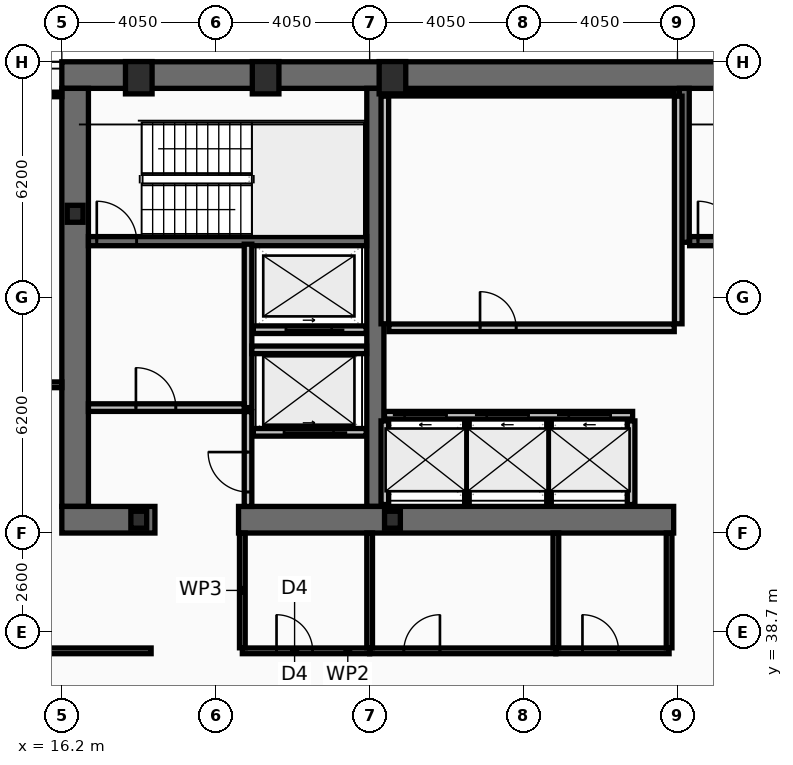
"""IFC4 building model, lengths in metres.
Left out: names, types, materials, properties, quantities, classifications, styles, units other than length and angle.
Written with IfcOpenShell. Run it as: python <this file> out.ifc"""

import sys

from ifc_helpers import new_model, si_unit, direction, frame, frame_2d, origin, origin_2d, place, context, subcontext, project, spatial, rectangle, hollow_rectangle, i_section, extrude, element, fill, save


model = new_model("IFC4")
c1 = context("Model", 3, precision=1e-05, world=origin(), true_north=direction((0.0, 1.0)))
c2 = subcontext(c1, "Body", "Model", "MODEL_VIEW")
j1 = project(units=[si_unit("LENGTHUNIT", "METRE"), si_unit("PLANEANGLEUNIT", "RADIAN")], contexts=[c1])
p1 = place(None, origin())
s1 = spatial("IfcSite", under=j1, at=p1, CompositionType="ELEMENT")
p2 = place(p1, origin())
s2 = spatial("IfcBuilding", under=s1, at=p2, CompositionType="ELEMENT")
p3 = place(p2, frame((0.0, 0.0, 157.8)))
s3 = spatial("IfcBuildingStorey", under=s2, at=p3, CompositionType="ELEMENT", Elevation=157.8)
p4 = place(p3, frame((16.2, 53.35, 0.0), z_axis=(0.0, 0.0, 1.0), x_axis=(1.0, 0.0, 0.0)))
e1 = element("IfcWall", 1, at=p4, inside=s3, PredefinedType="SHEAR", context=c2, shape_type="SweptSolid", body=[
    extrude(rectangle(XDim=40.5, YDim=0.7, at=frame_2d((20.25, 0.0))), origin(), (0.0, 0.0, 1.0), 3.44),
])
p5 = place(p3, frame((16.55, 42.0, 0.0), z_axis=(0.0, 0.0, 1.0), x_axis=(0.0, 1.0, 0.0)))
e2 = element("IfcWall", 2, at=p5, inside=s3, PredefinedType="SHEAR", context=c2, shape_type="SweptSolid", body=[
    extrude(rectangle(XDim=11.0, YDim=0.7, at=frame_2d((5.5, 0.0))), origin(), (0.0, 0.0, 1.0), 3.44),
])
p6 = place(p3, frame((24.45, 42.0, 0.0), z_axis=(0.0, 0.0, 1.0), x_axis=(0.0, 1.0, 0.0)))
e3 = element("IfcWall", 3, at=p6, inside=s3, PredefinedType="SHEAR", context=c2, shape_type="SweptSolid", body=[
    extrude(rectangle(XDim=11.0, YDim=0.45, at=frame_2d((5.5, 0.0))), origin(), (0.0, 0.0, 1.0), 3.44),
])
p7 = place(p3, frame((18.65, 41.65, 0.0), z_axis=(0.0, 0.0, 1.0), x_axis=(-1.0, 0.0, 0.0)))
e4 = element("IfcWall", 4, at=p7, inside=s3, PredefinedType="SHEAR", context=c2, shape_type="SweptSolid", body=[
    extrude(rectangle(XDim=2.45, YDim=0.7, at=frame_2d((1.225, 0.0))), origin(), (0.0, 0.0, 1.0), 3.44),
])
p8 = place(p3, frame((32.3, 41.65, 0.0), z_axis=(0.0, 0.0, 1.0), x_axis=(-1.0, 0.0, 0.0)))
e5 = element("IfcWall", 5, at=p8, inside=s3, PredefinedType="SHEAR", context=c2, shape_type="SweptSolid", body=[
    extrude(rectangle(XDim=11.45, YDim=0.7, at=frame_2d((5.725, 0.0))), origin(), (0.0, 0.0, 1.0), 3.44),
])
p9 = place(p3, frame((32.58, 48.95, 0.0), z_axis=(0.0, 0.0, 1.0), x_axis=(0.0, 1.0, 0.0)))
e6 = element("IfcWall", 6, at=p9, inside=s3, PredefinedType="SHEAR", context=c2, shape_type="SweptSolid", body=[
    extrude(rectangle(XDim=4.05, YDim=0.26, at=frame_2d((2.025, 0.0))), origin(), (0.0, 0.0, 1.0), 3.44),
])
p10 = place(p3, frame((16.9, 48.98, 0.0), z_axis=(0.0, 0.0, 1.0), x_axis=(1.0, 0.0, 0.0)))
e7 = element("IfcWall", 7, at=p10, inside=s3, PredefinedType="SHEAR", context=c2, shape_type="SweptSolid", body=[
    extrude(rectangle(XDim=7.32, YDim=0.24, at=frame_2d((3.66, 0.0))), origin(), (0.0, 0.0, 1.0), 3.44),
])
p11 = place(p10, frame((0.22, 0.0, 0.0)))
e8 = element("IfcOpeningElement", 8, at=p11, cuts=e7, PredefinedType="OPENING", context=c2, shape_type="SweptSolid", body=[
    extrude(rectangle(XDim=1.05, YDim=2.15, at=frame_2d((0.525, 1.075))), frame((0.0, 0.13, 0.0), z_axis=(0.0, -1.0, 0.0), x_axis=(1.0, 0.0, 0.0)), (0.0, 0.0, 1.0), 0.26),
])
p12 = place(p3, frame((32.72, 48.98, 0.0), z_axis=(0.0, 0.0, 1.0), x_axis=(1.0, 0.0, 0.0)))
e9 = element("IfcWall", 9, at=p12, inside=s3, PredefinedType="SHEAR", context=c2, shape_type="SweptSolid", body=[
    extrude(rectangle(XDim=7.56, YDim=0.24, at=frame_2d((3.78, 0.0))), origin(), (0.0, 0.0, 1.0), 3.44),
])
p13 = place(p12, frame((0.22, 0.0, 0.0)))
e10 = element("IfcOpeningElement", 10, at=p13, cuts=e9, PredefinedType="OPENING", context=c2, shape_type="SweptSolid", body=[
    extrude(rectangle(XDim=1.05, YDim=2.15, at=frame_2d((0.525, 1.075))), frame((0.0, 0.13, 0.0), z_axis=(0.0, -1.0, 0.0), x_axis=(1.0, 0.0, 0.0)), (0.0, 0.0, 1.0), 0.26),
])
for number, where, z_axis, x_axis in (
    (11, (18.225, 53.28, 0.0), (0.0, 0.0, 1.0), (1.0, 0.0, 0.0)),
    (12, (21.562, 53.28, 0.0), (0.0, 0.0, 1.0), (1.0, 0.0, 0.0)),
    (13, (24.9, 53.28, 0.0), (0.0, 0.0, 1.0), (1.0, 0.0, 0.0)),
):
    element("IfcColumn", number, at=place(p3, frame(where, z_axis=z_axis, x_axis=x_axis)), inside=s3, PredefinedType="COLUMN", context=c2, shape_type="SweptSolid", body=[
        extrude(hollow_rectangle(XDim=0.7, YDim=0.85, WallThickness=0.05, at=origin_2d()), origin(), (0.0, 0.0, 1.0), 3.6),
    ])
for number, where, z_axis, x_axis in (
    (14, (16.55, 49.7, 0.0), (0.0, 0.0, 1.0), (1.0, 0.0, 0.0)),
    (15, (18.225, 41.65, 0.0), (0.0, 0.0, 1.0), (1.0, 0.0, 0.0)),
    (16, (24.9, 41.65, 0.0), (0.0, 0.0, 1.0), (1.0, 0.0, 0.0)),
):
    element("IfcColumn", number, at=place(p3, frame(where, z_axis=z_axis, x_axis=x_axis)), inside=s3, PredefinedType="COLUMN", context=c2, shape_type="SweptSolid", body=[
        extrude(i_section(OverallWidth=0.416, OverallDepth=0.446, WebThickness=0.039, FlangeThickness=0.063, at=origin_2d()), origin(), (0.0, 0.0, 1.0), 3.6),
    ])
p14 = place(p3, frame((24.69, 44.4, 0.0), z_axis=(0.0, 0.0, 1.0), x_axis=(1.0, 0.0, 0.0)))
e17 = element("IfcWall", 17, at=p14, inside=s3, PredefinedType="PARTITIONING", context=c2, shape_type="SweptSolid", body=[
    extrude(rectangle(XDim=6.53, YDim=0.2, at=frame_2d((3.265, 0.0))), origin(), (0.0, 0.0, 1.0), 3.44),
])
p15 = place(p14, frame((0.53, 0.0, 0.0)))
e18 = element("IfcOpeningElement", 18, at=p15, cuts=e17, PredefinedType="OPENING", context=c2, shape_type="SweptSolid", body=[
    extrude(rectangle(XDim=1.1, YDim=2.18, at=frame_2d((0.55, 1.09))), frame((0.0, 0.11, 0.0), z_axis=(0.0, -1.0, 0.0), x_axis=(1.0, 0.0, 0.0)), (0.0, 0.0, 1.0), 0.22),
])
p16 = place(p14, frame((2.69, 0.0, 0.0)))
e19 = element("IfcOpeningElement", 19, at=p16, cuts=e17, PredefinedType="OPENING", context=c2, shape_type="SweptSolid", body=[
    extrude(rectangle(XDim=1.1, YDim=2.18, at=frame_2d((0.55, 1.09))), frame((0.0, 0.11, 0.0), z_axis=(0.0, -1.0, 0.0), x_axis=(1.0, 0.0, 0.0)), (0.0, 0.0, 1.0), 0.22),
])
p17 = place(p14, frame((4.85, 0.0, 0.0)))
e20 = element("IfcOpeningElement", 20, at=p17, cuts=e17, PredefinedType="OPENING", context=c2, shape_type="SweptSolid", body=[
    extrude(rectangle(XDim=1.1, YDim=2.18, at=frame_2d((0.55, 1.09))), frame((0.0, 0.11, 0.0), z_axis=(0.0, -1.0, 0.0), x_axis=(1.0, 0.0, 0.0)), (0.0, 0.0, 1.0), 0.22),
])
p18 = place(p3, frame((24.21, 43.95, 0.0), z_axis=(0.0, 0.0, 1.0), x_axis=(-1.0, 0.0, 0.0)))
e21 = element("IfcWall", 21, at=p18, inside=s3, PredefinedType="PARTITIONING", context=c2, shape_type="SweptSolid", body=[
    extrude(rectangle(XDim=2.97, YDim=0.2, at=frame_2d((1.485, 0.0))), origin(), (0.0, 0.0, 1.0), 3.44),
])
p19 = place(p18, frame((0.86, 0.0, 0.0)))
e22 = element("IfcOpeningElement", 22, at=p19, cuts=e21, PredefinedType="OPENING", context=c2, shape_type="SweptSolid", body=[
    extrude(rectangle(XDim=1.3, YDim=2.18, at=frame_2d((0.65, 1.09))), frame((0.0, 0.11, 0.0), z_axis=(0.0, -1.0, 0.0), x_axis=(1.0, 0.0, 0.0)), (0.0, 0.0, 1.0), 0.22),
])
p20 = place(p3, frame((24.21, 46.65, 0.0), z_axis=(0.0, 0.0, 1.0), x_axis=(-1.0, 0.0, 0.0)))
e23 = element("IfcWall", 23, at=p20, inside=s3, PredefinedType="PARTITIONING", context=c2, shape_type="SweptSolid", body=[
    extrude(rectangle(XDim=2.97, YDim=0.2, at=frame_2d((1.485, 0.0))), origin(), (0.0, 0.0, 1.0), 3.44),
])
p21 = place(p20, frame((0.91, 0.0, 0.0)))
e24 = element("IfcOpeningElement", 24, at=p21, cuts=e23, PredefinedType="OPENING", context=c2, shape_type="SweptSolid", body=[
    extrude(rectangle(XDim=1.2, YDim=2.18, at=frame_2d((0.6, 1.09))), frame((0.0, 0.11, 0.0), z_axis=(0.0, -1.0, 0.0), x_axis=(1.0, 0.0, 0.0)), (0.0, 0.0, 1.0), 0.22),
])
p22 = place(p3, frame((21.1, 44.6, 0.0), z_axis=(0.0, 0.0, 1.0), x_axis=(0.0, 1.0, 0.0)))
e25 = element("IfcWall", 25, at=p22, inside=s3, PredefinedType="PARTITIONING", context=c2, shape_type="SweptSolid", body=[
    extrude(rectangle(XDim=4.3, YDim=0.2, at=frame_2d((2.15, 0.0))), origin(), (0.0, 0.0, 1.0), 3.44),
])
p23 = place(p3, frame((16.9, 44.6, 0.0), z_axis=(0.0, 0.0, 1.0), x_axis=(1.0, 0.0, 0.0)))
e26 = element("IfcWall", 26, at=p23, inside=s3, PredefinedType="PARTITIONING", context=c2, shape_type="SweptSolid", body=[
    extrude(rectangle(XDim=4.1, YDim=0.2, at=frame_2d((2.05, 0.0))), origin(), (0.0, 0.0, 1.0), 3.44),
])
p24 = place(p23, frame((1.25, 0.0, 0.0)))
e27 = element("IfcOpeningElement", 27, at=p24, cuts=e26, PredefinedType="OPENING", context=c2, shape_type="SweptSolid", body=[
    extrude(rectangle(XDim=1.05, YDim=2.15, at=frame_2d((0.525, 1.075))), frame((0.0, 0.11, 0.0), z_axis=(0.0, -1.0, 0.0), x_axis=(1.0, 0.0, 0.0)), (0.0, 0.0, 1.0), 0.22),
])
p25 = place(p3, frame((21.2, 46.12, 0.0), z_axis=(0.0, 0.0, 1.0), x_axis=(1.0, 0.0, 0.0)))
e28 = element("IfcWall", 28, at=p25, inside=s3, PredefinedType="PARTITIONING", context=c2, shape_type="SweptSolid", body=[
    extrude(rectangle(XDim=3.02, YDim=0.2, at=frame_2d((1.51, 0.0))), origin(), (0.0, 0.0, 1.0), 3.44),
])
p26 = place(p3, frame((21.1, 42.0, 0.0), z_axis=(0.0, 0.0, 1.0), x_axis=(0.0, 1.0, 0.0)))
e29 = element("IfcWall", 29, at=p26, inside=s3, PredefinedType="PARTITIONING", context=c2, shape_type="SweptSolid", body=[
    extrude(rectangle(XDim=2.495, YDim=0.2, at=frame_2d((1.248, 0.0))), origin(), (0.0, 0.0, 1.0), 3.44),
])
p27 = place(p26, frame((0.38, 0.0, 0.0)))
e30 = element("IfcOpeningElement", 30, at=p27, cuts=e29, PredefinedType="OPENING", context=c2, shape_type="SweptSolid", body=[
    extrude(rectangle(XDim=1.05, YDim=2.15, at=frame_2d((0.525, 1.075))), frame((0.0, 0.11, 0.0), z_axis=(0.0, -1.0, 0.0), x_axis=(1.0, 0.0, 0.0)), (0.0, 0.0, 1.0), 0.22),
])
for number, where, z_axis, x_axis in (
    (31, (24.7, 46.805, 0.0), (0.0, 0.0, 1.0), (0.0, 1.0, 0.0)),
    (32, (32.42, 46.805, 0.0), (0.0, 0.0, 1.0), (0.0, 1.0, 0.0)),
):
    element("IfcWall", number, at=place(p3, frame(where, z_axis=z_axis, x_axis=x_axis)), inside=s3, PredefinedType="PARTITIONING", context=c2, shape_type="SweptSolid", body=[
        extrude(rectangle(XDim=5.99, YDim=0.2, at=frame_2d((2.995, 0.0))), origin(), (0.0, 0.0, 1.0), 3.44),
    ])
p28 = place(p3, frame((24.805, 52.86, 0.0), z_axis=(0.0, 0.0, 1.0), x_axis=(1.0, 0.0, 0.0)))
e33 = element("IfcWall", 33, at=p28, inside=s3, PredefinedType="PARTITIONING", context=c2, shape_type="SweptSolid", body=[
    extrude(rectangle(XDim=7.51, YDim=0.12, at=frame_2d((3.755, 0.0))), origin(), (0.0, 0.0, 1.0), 3.44),
])
p29 = place(p3, frame((24.805, 46.7, 0.0), z_axis=(0.0, 0.0, 1.0), x_axis=(1.0, 0.0, 0.0)))
e34 = element("IfcWall", 34, at=p29, inside=s3, PredefinedType="PARTITIONING", context=c2, shape_type="SweptSolid", body=[
    extrude(rectangle(XDim=7.51, YDim=0.2, at=frame_2d((3.755, 0.0))), origin(), (0.0, 0.0, 1.0), 3.44),
])
p30 = place(p29, frame((2.4, 0.0, 0.0)))
e35 = element("IfcOpeningElement", 35, at=p30, cuts=e34, PredefinedType="OPENING", context=c2, shape_type="SweptSolid", body=[
    extrude(rectangle(XDim=0.95, YDim=2.1, at=frame_2d((0.475, 1.05))), frame((0.0, 0.11, 0.0), z_axis=(0.0, -1.0, 0.0), x_axis=(1.0, 0.0, 0.0)), (0.0, 0.0, 1.0), 0.22),
])
for number, where, z_axis, x_axis in (
    (36, (24.7, 42.05, 0.0), (0.0, 0.0, 1.0), (0.0, 1.0, 0.0)),
    (37, (31.18, 42.05, 0.0), (0.0, 0.0, 1.0), (0.0, 1.0, 0.0)),
):
    element("IfcWall", number, at=place(p3, frame(where, z_axis=z_axis, x_axis=x_axis)), inside=s3, PredefinedType="PARTITIONING", context=c2, shape_type="SweptSolid", body=[
        extrude(rectangle(XDim=2.2, YDim=0.2, at=frame_2d((1.1, 0.0))), origin(), (0.0, 0.0, 1.0), 3.44),
    ])
for number, where, z_axis, x_axis in (
    (38, (26.86, 42.05, 0.0), (0.0, 0.0, 1.0), (0.0, 1.0, 0.0)),
    (39, (29.02, 42.05, 0.0), (0.0, 0.0, 1.0), (0.0, 1.0, 0.0)),
):
    element("IfcWall", number, at=place(p3, frame(where, z_axis=z_axis, x_axis=x_axis)), inside=s3, PredefinedType="PARTITIONING", context=c2, shape_type="SweptSolid", body=[
        extrude(rectangle(XDim=2.2, YDim=0.12, at=frame_2d((1.1, 0.0))), origin(), (0.0, 0.0, 1.0), 3.44),
    ])
p31 = place(p3, frame((20.95, 38.2, 0.0), z_axis=(0.0, 0.0, 1.0), x_axis=(1.0, 0.0, 0.0)))
e40 = element("IfcWall", 40, at=p31, inside=s3, PredefinedType="PARTITIONING", context=c2, shape_type="SweptSolid", body=[
    extrude(rectangle(XDim=3.35, YDim=0.15, at=frame_2d((1.675, 0.0))), origin(), (0.0, 0.0, 1.0), 3.44),
])
p32 = place(p31, frame((0.9, 0.0, 0.0)))
e41 = element("IfcOpeningElement", 41, at=p32, cuts=e40, PredefinedType="OPENING", context=c2, shape_type="SweptSolid", body=[
    extrude(rectangle(XDim=0.95, YDim=2.05, at=frame_2d((0.475, 1.025))), frame((0.0, 0.085, 0.0), z_axis=(0.0, -1.0, 0.0), x_axis=(1.0, 0.0, 0.0)), (0.0, 0.0, 1.0), 0.17),
])
p33 = place(p3, frame((24.3, 38.2, 0.0), z_axis=(0.0, 0.0, 1.0), x_axis=(1.0, 0.0, 0.0)))
e42 = element("IfcWall", 42, at=p33, inside=s3, PredefinedType="PARTITIONING", context=c2, shape_type="SweptSolid", body=[
    extrude(rectangle(XDim=4.9, YDim=0.15, at=frame_2d((2.45, 0.0))), origin(), (0.0, 0.0, 1.0), 2.73),
])
p34 = place(p33, frame((0.9, 0.0, 0.0)))
e43 = element("IfcOpeningElement", 43, at=p34, cuts=e42, PredefinedType="OPENING", context=c2, shape_type="SweptSolid", body=[
    extrude(rectangle(XDim=0.95, YDim=2.05, at=frame_2d((0.475, 1.025))), frame((0.0, 0.085, 0.0), z_axis=(0.0, -1.0, 0.0), x_axis=(1.0, 0.0, 0.0)), (0.0, 0.0, 1.0), 0.17),
])
p35 = place(p3, frame((29.2, 38.2, 0.0), z_axis=(0.0, 0.0, 1.0), x_axis=(1.0, 0.0, 0.0)))
e44 = element("IfcWall", 44, at=p35, inside=s3, PredefinedType="PARTITIONING", context=c2, shape_type="SweptSolid", body=[
    extrude(rectangle(XDim=2.98, YDim=0.15, at=frame_2d((1.49, 0.0))), origin(), (0.0, 0.0, 1.0), 2.73),
])
p36 = place(p35, frame((0.7, 0.0, 0.0)))
e45 = element("IfcOpeningElement", 45, at=p36, cuts=e44, PredefinedType="OPENING", context=c2, shape_type="SweptSolid", body=[
    extrude(rectangle(XDim=0.95, YDim=2.05, at=frame_2d((0.475, 1.025))), frame((0.0, 0.085, 0.0), z_axis=(0.0, -1.0, 0.0), x_axis=(1.0, 0.0, 0.0)), (0.0, 0.0, 1.0), 0.17),
])
for number, where, z_axis, x_axis in (
    (46, (20.95, 38.28, 0.0), (0.0, 0.0, 1.0), (0.0, 1.0, 0.0)),
    (47, (24.3, 38.28, 0.0), (0.0, 0.0, 1.0), (0.0, 1.0, 0.0)),
    (48, (29.2, 38.28, 0.0), (0.0, 0.0, 1.0), (0.0, 1.0, 0.0)),
    (49, (32.18, 38.28, 0.0), (0.0, 0.0, 1.0), (0.0, 1.0, 0.0)),
):
    element("IfcWall", number, at=place(p3, frame(where, z_axis=z_axis, x_axis=x_axis)), inside=s3, PredefinedType="PARTITIONING", context=c2, shape_type="SweptSolid", body=[
        extrude(rectangle(XDim=3.02, YDim=0.15, at=frame_2d((1.51, 0.0))), origin(), (0.0, 0.0, 1.0), 3.44),
    ])
p37 = place(p3, frame((6.03, 38.2, 0.0), z_axis=(0.0, 0.0, 1.0), x_axis=(1.0, 0.0, 0.0)))
e50 = element("IfcWall", 50, at=p37, inside=s3, PredefinedType="PARTITIONING", context=c2, shape_type="SweptSolid", body=[
    extrude(rectangle(XDim=12.52, YDim=0.15, at=frame_2d((6.26, 0.0))), origin(), (0.0, 0.0, 1.0), 2.73),
])
p38 = place(p37, frame((8.32, 0.0, 0.0)))
e51 = element("IfcOpeningElement", 51, at=p38, cuts=e50, PredefinedType="OPENING", context=c2, shape_type="SweptSolid", body=[
    extrude(rectangle(XDim=0.95, YDim=2.05, at=frame_2d((0.475, 1.025))), frame((0.0, 0.085, 0.0), z_axis=(0.0, -1.0, 0.0), x_axis=(1.0, 0.0, 0.0)), (0.0, 0.0, 1.0), 0.17),
])
p39 = place(p3, frame((6.095, 45.2, 0.0), z_axis=(0.0, 0.0, 1.0), x_axis=(1.0, 0.0, 0.0)))
e52 = element("IfcWall", 52, at=p39, inside=s3, PredefinedType="PARTITIONING", context=c2, shape_type="SweptSolid", body=[
    extrude(rectangle(XDim=10.105, YDim=0.15, at=frame_2d((5.052, 0.0))), origin(), (0.0, 0.0, 1.0), 2.83),
])
p40 = place(p39, frame((8.32, 0.0, 0.0)))
e53 = element("IfcOpeningElement", 53, at=p40, cuts=e52, PredefinedType="OPENING", context=c2, shape_type="SweptSolid", body=[
    extrude(rectangle(XDim=0.9, YDim=2.05, at=frame_2d((0.45, 1.025))), frame((0.0, 0.085, 0.0), z_axis=(0.0, -1.0, 0.0), x_axis=(1.0, 0.0, 0.0)), (0.0, 0.0, 1.0), 0.17),
])
p41 = place(p3, frame((6.095, 52.84, 0.0), z_axis=(0.0, 0.0, 1.0), x_axis=(1.0, 0.0, 0.0)))
e54 = element("IfcWall", 54, at=p41, inside=s3, PredefinedType="PARTITIONING", context=c2, shape_type="SweptSolid", body=[
    extrude(rectangle(XDim=10.105, YDim=0.12, at=frame_2d((5.052, 0.0))), origin(), (0.0, 0.0, 1.0), 3.44),
])
p42 = place(p11, origin())
e55 = element("IfcDoor", 55, at=p42, inside=s3, OperationType="SINGLE_SWING_LEFT", PredefinedType="DOOR", context=c2, shape_type="SweptSolid", body=[
    extrude(rectangle(XDim=1.05, YDim=2.15, at=frame_2d((0.525, 1.075))), frame((0.0, 0.025, 0.0), z_axis=(0.0, -1.0, 0.0), x_axis=(1.0, 0.0, 0.0)), (0.0, 0.0, 1.0), 0.05),
])
fill(e8, e55)
p43 = place(p13, origin())
e56 = element("IfcDoor", 56, at=p43, inside=s3, OperationType="SINGLE_SWING_LEFT", PredefinedType="DOOR", context=c2, shape_type="SweptSolid", body=[
    extrude(rectangle(XDim=1.05, YDim=2.15, at=frame_2d((0.525, 1.075))), frame((0.0, 0.025, 0.0), z_axis=(0.0, -1.0, 0.0), x_axis=(1.0, 0.0, 0.0)), (0.0, 0.0, 1.0), 0.05),
])
fill(e10, e56)
p44 = place(p15, origin())
e57 = element("IfcDoor", 57, at=p44, inside=s3, OperationType="SLIDING_TO_LEFT", PredefinedType="DOOR", context=c2, shape_type="SweptSolid", body=[
    extrude(rectangle(XDim=1.1, YDim=2.18, at=frame_2d((0.55, 1.09))), frame((0.0, 0.025, 0.0), z_axis=(0.0, -1.0, 0.0), x_axis=(1.0, 0.0, 0.0)), (0.0, 0.0, 1.0), 0.05),
])
fill(e18, e57)
p45 = place(p16, origin())
e58 = element("IfcDoor", 58, at=p45, inside=s3, OperationType="SLIDING_TO_LEFT", PredefinedType="DOOR", context=c2, shape_type="SweptSolid", body=[
    extrude(rectangle(XDim=1.1, YDim=2.18, at=frame_2d((0.55, 1.09))), frame((0.0, 0.025, 0.0), z_axis=(0.0, -1.0, 0.0), x_axis=(1.0, 0.0, 0.0)), (0.0, 0.0, 1.0), 0.05),
])
fill(e19, e58)
p46 = place(p17, origin())
e59 = element("IfcDoor", 59, at=p46, inside=s3, OperationType="SLIDING_TO_LEFT", PredefinedType="DOOR", context=c2, shape_type="SweptSolid", body=[
    extrude(rectangle(XDim=1.1, YDim=2.18, at=frame_2d((0.55, 1.09))), frame((0.0, 0.025, 0.0), z_axis=(0.0, -1.0, 0.0), x_axis=(1.0, 0.0, 0.0)), (0.0, 0.0, 1.0), 0.05),
])
fill(e20, e59)
p47 = place(p19, origin())
e60 = element("IfcDoor", 60, at=p47, inside=s3, OperationType="SLIDING_TO_LEFT", PredefinedType="DOOR", context=c2, shape_type="SweptSolid", body=[
    extrude(rectangle(XDim=1.3, YDim=2.18, at=frame_2d((0.65, 1.09))), frame((0.0, 0.025, 0.0), z_axis=(0.0, -1.0, 0.0), x_axis=(1.0, 0.0, 0.0)), (0.0, 0.0, 1.0), 0.05),
])
fill(e22, e60)
p48 = place(p21, origin())
e61 = element("IfcDoor", 61, at=p48, inside=s3, OperationType="SLIDING_TO_LEFT", PredefinedType="DOOR", context=c2, shape_type="SweptSolid", body=[
    extrude(rectangle(XDim=1.2, YDim=2.18, at=frame_2d((0.6, 1.09))), frame((0.0, 0.025, 0.0), z_axis=(0.0, -1.0, 0.0), x_axis=(1.0, 0.0, 0.0)), (0.0, 0.0, 1.0), 0.05),
])
fill(e24, e61)
p49 = place(p24, origin())
e62 = element("IfcDoor", 62, at=p49, inside=s3, OperationType="SINGLE_SWING_LEFT", PredefinedType="DOOR", context=c2, shape_type="SweptSolid", body=[
    extrude(rectangle(XDim=1.05, YDim=2.15, at=frame_2d((0.525, 1.075))), frame((0.0, 0.025, 0.0), z_axis=(0.0, -1.0, 0.0), x_axis=(1.0, 0.0, 0.0)), (0.0, 0.0, 1.0), 0.05),
])
fill(e27, e62)
p50 = place(p27, origin())
e63 = element("IfcDoor", 63, at=p50, inside=s3, OperationType="SINGLE_SWING_RIGHT", PredefinedType="DOOR", context=c2, shape_type="SweptSolid", body=[
    extrude(rectangle(XDim=1.05, YDim=2.15, at=frame_2d((0.525, 1.075))), frame((0.0, 0.025, 0.0), z_axis=(0.0, -1.0, 0.0), x_axis=(1.0, 0.0, 0.0)), (0.0, 0.0, 1.0), 0.05),
])
fill(e30, e63)
p51 = place(p30, origin())
e64 = element("IfcDoor", 64, at=p51, inside=s3, OperationType="SINGLE_SWING_LEFT", PredefinedType="DOOR", context=c2, shape_type="SweptSolid", body=[
    extrude(rectangle(XDim=0.95, YDim=2.1, at=frame_2d((0.475, 1.05))), frame((0.0, 0.025, 0.0), z_axis=(0.0, -1.0, 0.0), x_axis=(1.0, 0.0, 0.0)), (0.0, 0.0, 1.0), 0.05),
])
fill(e35, e64)
p52 = place(p32, origin())
e65 = element("IfcDoor", 65, at=p52, inside=s3, OperationType="SINGLE_SWING_LEFT", PredefinedType="DOOR", context=c2, shape_type="SweptSolid", body=[
    extrude(rectangle(XDim=0.95, YDim=2.05, at=frame_2d((0.475, 1.025))), frame((0.0, 0.025, 0.0), z_axis=(0.0, -1.0, 0.0), x_axis=(1.0, 0.0, 0.0)), (0.0, 0.0, 1.0), 0.05),
])
fill(e41, e65)
p53 = place(p34, origin())
e66 = element("IfcDoor", 66, at=p53, inside=s3, OperationType="SINGLE_SWING_RIGHT", PredefinedType="DOOR", context=c2, shape_type="SweptSolid", body=[
    extrude(rectangle(XDim=0.95, YDim=2.05, at=frame_2d((0.475, 1.025))), frame((0.0, 0.025, 0.0), z_axis=(0.0, -1.0, 0.0), x_axis=(1.0, 0.0, 0.0)), (0.0, 0.0, 1.0), 0.05),
])
fill(e43, e66)
p54 = place(p36, origin())
e67 = element("IfcDoor", 67, at=p54, inside=s3, OperationType="SINGLE_SWING_LEFT", PredefinedType="DOOR", context=c2, shape_type="SweptSolid", body=[
    extrude(rectangle(XDim=0.95, YDim=2.05, at=frame_2d((0.475, 1.025))), frame((0.0, 0.025, 0.0), z_axis=(0.0, -1.0, 0.0), x_axis=(1.0, 0.0, 0.0)), (0.0, 0.0, 1.0), 0.05),
])
fill(e45, e67)
save(model, sys.argv[1])
